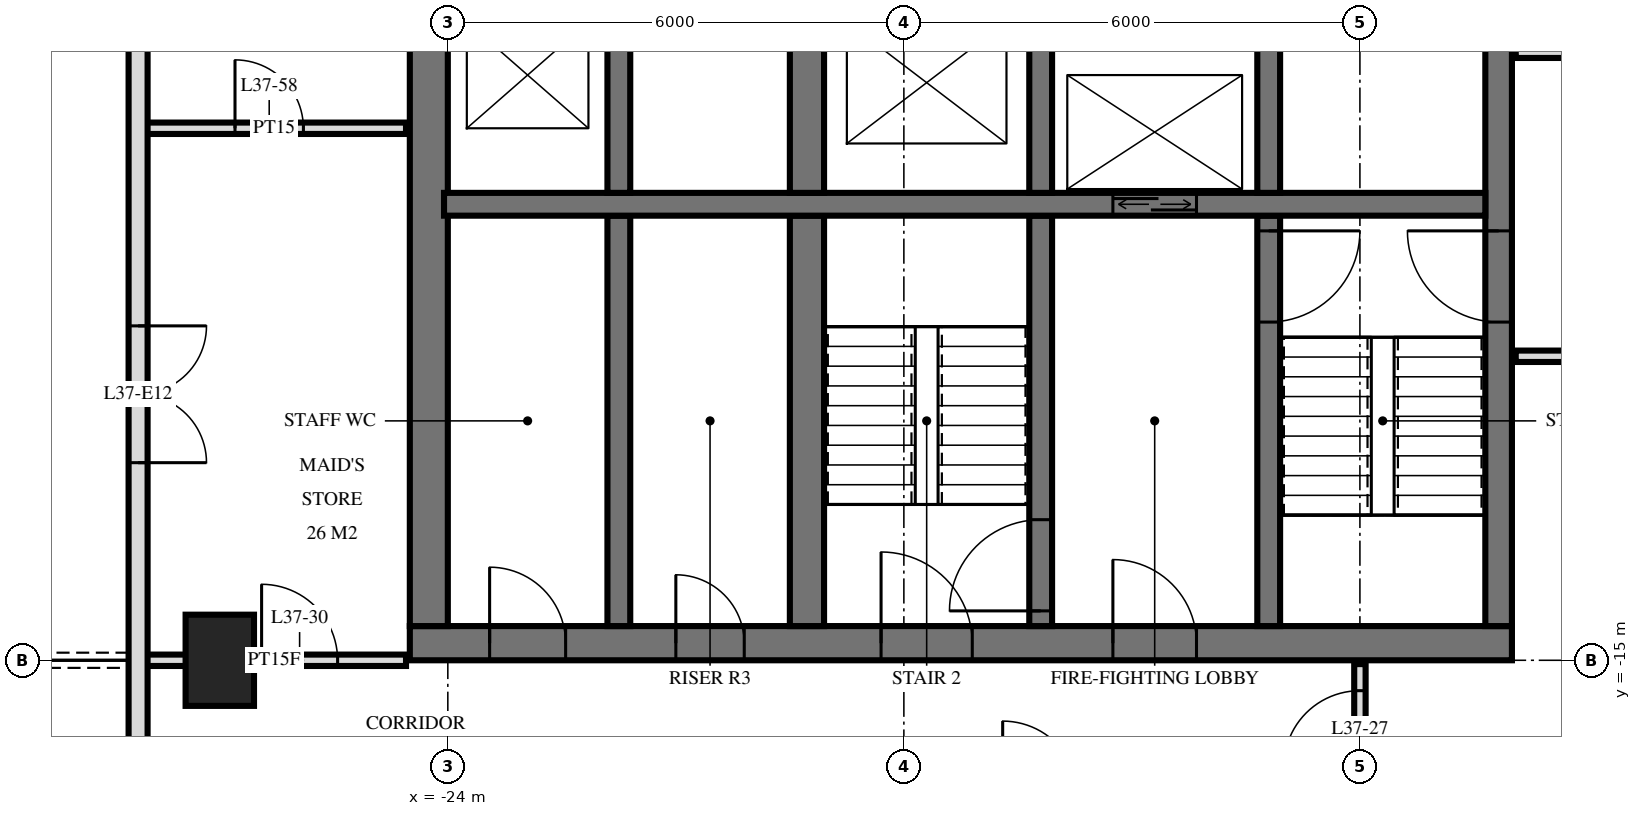
"""IFC4 building model, lengths in metres.
Left out: names, types, materials, properties, quantities, classifications, styles, units other than length and angle.
Written with IfcOpenShell. Run it as: python <this file> out.ifc"""

import sys

from ifc_helpers import new_model, si_unit, direction, frame, frame_2d, origin, origin_2d, place, context, subcontext, project, spatial, rectangle, extrude, element, fill, save


model = new_model("IFC4")
c1 = context("Model", 3, precision=1e-05, world=origin(), true_north=direction((0.0, 1.0)))
c2 = subcontext(c1, "Body", "Model", "MODEL_VIEW")
j1 = project(units=[si_unit("LENGTHUNIT", "METRE"), si_unit("PLANEANGLEUNIT", "RADIAN")], contexts=[c1])
p1 = place(None, origin())
s1 = spatial("IfcSite", under=j1, at=p1, CompositionType="ELEMENT")
p2 = place(p1, origin())
s2 = spatial("IfcBuilding", under=s1, at=p2, CompositionType="ELEMENT")
p3 = place(p2, frame((0.0, 0.0, 145.2)))
s3 = spatial("IfcBuildingStorey", under=s2, at=p3, CompositionType="ELEMENT", Elevation=145.2)
p4 = place(p3, frame((-27.0, -15.0, 0.0), z_axis=(0.0, 0.0, 1.0), x_axis=(0.0, 1.0, 0.0)))
e1 = element("IfcColumn", 1, at=p4, inside=s3, PredefinedType="COLUMN", context=c2, shape_type="SweptSolid", body=[
    extrude(rectangle(XDim=1.2, YDim=0.9, at=origin_2d()), origin(), (0.0, 0.0, 1.0), 3.6),
])
p5 = place(p3, frame((-24.5, -14.775, 0.0), z_axis=(0.0, 0.0, 1.0), x_axis=(1.0, 0.0, 0.0)))
e2 = element("IfcWall", 2, at=p5, inside=s3, PredefinedType="SHEAR", context=c2, shape_type="SweptSolid", body=[
    extrude(rectangle(XDim=14.5, YDim=0.45, at=frame_2d((7.25, 0.0))), origin(), (0.0, 0.0, 1.0), 3.6),
])
p6 = place(p5, frame((6.2, 0.0, 0.0)))
e3 = element("IfcOpeningElement", 3, at=p6, cuts=e2, PredefinedType="OPENING", context=c2, shape_type="SweptSolid", body=[
    extrude(rectangle(XDim=1.2, YDim=2.1, at=frame_2d((0.6, 1.05))), frame((0.0, 0.235, 0.0), z_axis=(0.0, -1.0, 0.0), x_axis=(1.0, 0.0, 0.0)), (0.0, 0.0, 1.0), 0.47),
])
p7 = place(p5, frame((9.25, 0.0, 0.0)))
e4 = element("IfcOpeningElement", 4, at=p7, cuts=e2, PredefinedType="OPENING", context=c2, shape_type="SweptSolid", body=[
    extrude(rectangle(XDim=1.1, YDim=2.1, at=frame_2d((0.55, 1.05))), frame((0.0, 0.235, 0.0), z_axis=(0.0, -1.0, 0.0), x_axis=(1.0, 0.0, 0.0)), (0.0, 0.0, 1.0), 0.47),
])
p8 = place(p5, frame((3.5, 0.0, 0.0)))
e5 = element("IfcOpeningElement", 5, at=p8, cuts=e2, PredefinedType="OPENING", context=c2, shape_type="SweptSolid", body=[
    extrude(rectangle(XDim=0.9, YDim=2.1, at=frame_2d((0.45, 1.05))), frame((0.0, 0.235, 0.0), z_axis=(0.0, -1.0, 0.0), x_axis=(1.0, 0.0, 0.0)), (0.0, 0.0, 1.0), 0.47),
])
p9 = place(p5, frame((1.05, 0.0, 0.0)))
e6 = element("IfcOpeningElement", 6, at=p9, cuts=e2, PredefinedType="OPENING", context=c2, shape_type="SweptSolid", body=[
    extrude(rectangle(XDim=1.0, YDim=2.1, at=frame_2d((0.5, 1.05))), frame((0.0, 0.235, 0.0), z_axis=(0.0, -1.0, 0.0), x_axis=(1.0, 0.0, 0.0)), (0.0, 0.0, 1.0), 0.47),
])
p10 = place(p3, frame((-10.175, -14.55, 0.0), z_axis=(0.0, 0.0, 1.0), x_axis=(0.0, 1.0, 0.0)))
e7 = element("IfcWall", 7, at=p10, inside=s3, PredefinedType="SHEAR", context=c2, shape_type="SweptSolid", body=[
    extrude(rectangle(XDim=14.1, YDim=0.35, at=frame_2d((7.05, 0.0))), origin(), (0.0, 0.0, 1.0), 3.6),
])
p11 = place(p10, frame((8.4, 0.0, 0.0)))
e8 = element("IfcOpeningElement", 8, at=p11, cuts=e7, PredefinedType="OPENING", context=c2, shape_type="SweptSolid", body=[
    extrude(rectangle(XDim=1.4, YDim=2.4, at=frame_2d((0.7, 1.2))), frame((0.0, 0.185, 0.0), z_axis=(0.0, -1.0, 0.0), x_axis=(1.0, 0.0, 0.0)), (0.0, 0.0, 1.0), 0.37),
])
p12 = place(p10, frame((10.0, 0.0, 0.0)))
e9 = element("IfcOpeningElement", 9, at=p12, cuts=e7, PredefinedType="OPENING", context=c2, shape_type="SweptSolid", body=[
    extrude(rectangle(XDim=1.4, YDim=2.4, at=frame_2d((0.7, 1.2))), frame((0.0, 0.185, 0.0), z_axis=(0.0, -1.0, 0.0), x_axis=(1.0, 0.0, 0.0)), (0.0, 0.0, 1.0), 0.37),
])
p13 = place(p10, frame((4.0, 0.0, 0.0)))
e10 = element("IfcOpeningElement", 10, at=p13, cuts=e7, PredefinedType="OPENING", context=c2, shape_type="SweptSolid", body=[
    extrude(rectangle(XDim=1.2, YDim=2.1, at=frame_2d((0.6, 1.05))), frame((0.0, 0.185, 0.0), z_axis=(0.0, -1.0, 0.0), x_axis=(1.0, 0.0, 0.0)), (0.0, 0.0, 1.0), 0.37),
])
p14 = place(p3, frame((-24.25, -14.55, 0.0), z_axis=(0.0, 0.0, 1.0), x_axis=(0.0, 1.0, 0.0)))
e11 = element("IfcWall", 11, at=p14, inside=s3, PredefinedType="SHEAR", context=c2, shape_type="SweptSolid", body=[
    extrude(rectangle(XDim=14.1, YDim=0.5, at=frame_2d((7.05, 0.0))), origin(), (0.0, 0.0, 1.0), 3.6),
])
p15 = place(p3, frame((-24.05, -9.0, 0.0), z_axis=(0.0, 0.0, 1.0), x_axis=(1.0, 0.0, 0.0)))
e12 = element("IfcWall", 12, at=p15, inside=s3, PredefinedType="SHEAR", context=c2, shape_type="SweptSolid", body=[
    extrude(rectangle(XDim=13.7, YDim=0.3, at=frame_2d((6.85, 0.0))), origin(), (0.0, 0.0, 1.0), 3.6),
])
p16 = place(p15, frame((8.8, 0.0, 0.0)))
e13 = element("IfcOpeningElement", 13, at=p16, cuts=e12, PredefinedType="OPENING", context=c2, shape_type="SweptSolid", body=[
    extrude(rectangle(XDim=1.1, YDim=2.1, at=frame_2d((0.55, 1.05))), frame((0.0, 0.16, 0.0), z_axis=(0.0, -1.0, 0.0), x_axis=(1.0, 0.0, 0.0)), (0.0, 0.0, 1.0), 0.32),
])
p17 = place(p3, frame((-13.2, -8.85, 0.0), z_axis=(0.0, 0.0, 1.0), x_axis=(0.0, 1.0, 0.0)))
e14 = element("IfcWall", 14, at=p17, inside=s3, PredefinedType="SHEAR", context=c2, shape_type="SweptSolid", body=[
    extrude(rectangle(XDim=2.3, YDim=0.3, at=frame_2d((1.15, 0.0))), origin(), (0.0, 0.0, 1.0), 3.6),
])
p18 = place(p3, frame((-13.2, -14.55, 0.0), z_axis=(0.0, 0.0, 1.0), x_axis=(0.0, 1.0, 0.0)))
e15 = element("IfcWall", 15, at=p18, inside=s3, PredefinedType="SHEAR", context=c2, shape_type="SweptSolid", body=[
    extrude(rectangle(XDim=5.4, YDim=0.3, at=frame_2d((2.7, 0.0))), origin(), (0.0, 0.0, 1.0), 3.6),
])
p19 = place(p18, frame((4.0, 0.0, 0.0)))
e16 = element("IfcOpeningElement", 16, at=p19, cuts=e15, PredefinedType="OPENING", context=c2, shape_type="SweptSolid", body=[
    extrude(rectangle(XDim=1.2, YDim=2.1, at=frame_2d((0.6, 1.05))), frame((0.0, 0.16, 0.0), z_axis=(0.0, -1.0, 0.0), x_axis=(1.0, 0.0, 0.0)), (0.0, 0.0, 1.0), 0.32),
])
p20 = place(p3, frame((-16.2, -8.85, 0.0), z_axis=(0.0, 0.0, 1.0), x_axis=(0.0, 1.0, 0.0)))
e17 = element("IfcWall", 17, at=p20, inside=s3, PredefinedType="SHEAR", context=c2, shape_type="SweptSolid", body=[
    extrude(rectangle(XDim=2.3, YDim=0.3, at=frame_2d((1.15, 0.0))), origin(), (0.0, 0.0, 1.0), 3.6),
])
p21 = place(p3, frame((-16.2, -14.55, 0.0), z_axis=(0.0, 0.0, 1.0), x_axis=(0.0, 1.0, 0.0)))
e18 = element("IfcWall", 18, at=p21, inside=s3, PredefinedType="SHEAR", context=c2, shape_type="SweptSolid", body=[
    extrude(rectangle(XDim=5.4, YDim=0.3, at=frame_2d((2.7, 0.0))), origin(), (0.0, 0.0, 1.0), 3.6),
])
p22 = place(p21, frame((0.2, 0.0, 0.0)))
e19 = element("IfcOpeningElement", 19, at=p22, cuts=e18, PredefinedType="OPENING", context=c2, shape_type="SweptSolid", body=[
    extrude(rectangle(XDim=1.2, YDim=2.1, at=frame_2d((0.6, 1.05))), frame((0.0, 0.16, 0.0), z_axis=(0.0, -1.0, 0.0), x_axis=(1.0, 0.0, 0.0)), (0.0, 0.0, 1.0), 0.32),
])
p23 = place(p3, frame((-19.275, -8.85, 0.0), z_axis=(0.0, 0.0, 1.0), x_axis=(0.0, 1.0, 0.0)))
e20 = element("IfcWall", 20, at=p23, inside=s3, PredefinedType="SHEAR", context=c2, shape_type="SweptSolid", body=[
    extrude(rectangle(XDim=2.3, YDim=0.45, at=frame_2d((1.15, 0.0))), origin(), (0.0, 0.0, 1.0), 3.6),
])
p24 = place(p3, frame((-19.275, -14.55, 0.0), z_axis=(0.0, 0.0, 1.0), x_axis=(0.0, 1.0, 0.0)))
e21 = element("IfcWall", 21, at=p24, inside=s3, PredefinedType="SHEAR", context=c2, shape_type="SweptSolid", body=[
    extrude(rectangle(XDim=5.4, YDim=0.45, at=frame_2d((2.7, 0.0))), origin(), (0.0, 0.0, 1.0), 3.6),
])
p25 = place(p3, frame((-21.75, -8.85, 0.0), z_axis=(0.0, 0.0, 1.0), x_axis=(0.0, 1.0, 0.0)))
e22 = element("IfcWall", 22, at=p25, inside=s3, PredefinedType="SHEAR", context=c2, shape_type="SweptSolid", body=[
    extrude(rectangle(XDim=2.3, YDim=0.3, at=frame_2d((1.15, 0.0))), origin(), (0.0, 0.0, 1.0), 3.6),
])
p26 = place(p3, frame((-21.75, -14.55, 0.0), z_axis=(0.0, 0.0, 1.0), x_axis=(0.0, 1.0, 0.0)))
e23 = element("IfcWall", 23, at=p26, inside=s3, PredefinedType="SHEAR", context=c2, shape_type="SweptSolid", body=[
    extrude(rectangle(XDim=5.4, YDim=0.3, at=frame_2d((2.7, 0.0))), origin(), (0.0, 0.0, 1.0), 3.6),
])
p27 = place(p3, frame((-28.075, -3.325, 0.0), z_axis=(0.0, 0.0, 1.0), x_axis=(0.0, -1.0, 0.0)))
e24 = element("IfcWall", 24, at=p27, inside=s3, PredefinedType="SOLIDWALL", context=c2, shape_type="SweptSolid", body=[
    extrude(rectangle(XDim=25.951, YDim=0.25, at=frame_2d((12.975, 0.0))), origin(), (0.0, 0.0, 1.0), 3.32),
])
p28 = place(p27, frame((7.275, 0.0, 0.0)))
e25 = element("IfcOpeningElement", 25, at=p28, cuts=e24, PredefinedType="OPENING", context=c2, shape_type="SweptSolid", body=[
    extrude(rectangle(XDim=1.8, YDim=2.4, at=frame_2d((0.9, 1.2))), frame((0.0, 0.135, 0.0), z_axis=(0.0, -1.0, 0.0), x_axis=(1.0, 0.0, 0.0)), (0.0, 0.0, 1.0), 0.27),
])
p29 = place(p27, frame((18.175, 0.0, 0.0)))
e26 = element("IfcOpeningElement", 26, at=p29, cuts=e24, PredefinedType="OPENING", context=c2, shape_type="SweptSolid", body=[
    extrude(rectangle(XDim=1.8, YDim=2.4, at=frame_2d((0.9, 1.2))), frame((0.0, 0.135, 0.0), z_axis=(0.0, -1.0, 0.0), x_axis=(1.0, 0.0, 0.0)), (0.0, 0.0, 1.0), 0.27),
])
p30 = place(p27, frame((21.075, 0.0, 0.0)))
e27 = element("IfcOpeningElement", 27, at=p30, cuts=e24, PredefinedType="OPENING", context=c2, shape_type="SweptSolid", body=[
    extrude(rectangle(XDim=1.8, YDim=2.4, at=frame_2d((0.9, 1.2))), frame((0.0, 0.135, 0.0), z_axis=(0.0, -1.0, 0.0), x_axis=(1.0, 0.0, 0.0)), (0.0, 0.0, 1.0), 0.27),
])
p31 = place(p27, frame((23.825, 0.0, 0.3)))
e28 = element("IfcOpeningElement", 28, at=p31, cuts=e24, PredefinedType="OPENING", context=c2, shape_type="SweptSolid", body=[
    extrude(rectangle(XDim=1.8, YDim=2.1, at=frame_2d((0.9, 1.05))), frame((0.0, 0.135, 0.0), z_axis=(0.0, -1.0, 0.0), x_axis=(1.0, 0.0, 0.0)), (0.0, 0.0, 1.0), 0.27),
])
p32 = place(p3, frame((-12.0, -16.8, 0.0), z_axis=(0.0, 0.0, 1.0), x_axis=(0.0, 1.0, 0.0)))
e29 = element("IfcWall", 29, at=p32, inside=s3, PredefinedType="PARTITIONING", context=c2, shape_type="SweptSolid", body=[
    extrude(rectangle(XDim=1.75, YDim=0.15, at=frame_2d((0.875, 0.0))), origin(), (0.0, 0.0, 1.0), 3.32),
])
p33 = place(p32, frame((0.4, 0.0, 0.0)))
e30 = element("IfcOpeningElement", 30, at=p33, cuts=e29, PredefinedType="OPENING", context=c2, shape_type="SweptSolid", body=[
    extrude(rectangle(XDim=1.0, YDim=2.1, at=frame_2d((0.5, 1.05))), frame((0.0, 0.085, 0.0), z_axis=(0.0, -1.0, 0.0), x_axis=(1.0, 0.0, 0.0)), (0.0, 0.0, 1.0), 0.17),
])
p34 = place(p3, frame((-28.02, -15.0, 0.0), z_axis=(0.0, 0.0, 1.0), x_axis=(1.0, 0.0, 0.0)))
e31 = element("IfcWall", 31, at=p34, inside=s3, PredefinedType="PARTITIONING", context=c2, shape_type="SweptSolid", body=[
    extrude(rectangle(XDim=3.47, YDim=0.15, at=frame_2d((1.735, 0.0))), origin(), (0.0, 0.0, 1.0), 3.32),
])
p35 = place(p34, frame((1.57, 0.0, 0.0)))
e32 = element("IfcOpeningElement", 32, at=p35, cuts=e31, PredefinedType="OPENING", context=c2, shape_type="SweptSolid", body=[
    extrude(rectangle(XDim=1.0, YDim=2.1, at=frame_2d((0.5, 1.05))), frame((0.0, 0.085, 0.0), z_axis=(0.0, -1.0, 0.0), x_axis=(1.0, 0.0, 0.0)), (0.0, 0.0, 1.0), 0.17),
])
p36 = place(p3, frame((-9.95, -11.0, 0.0), z_axis=(0.0, 0.0, 1.0), x_axis=(1.0, 0.0, 0.0)))
e33 = element("IfcWall", 33, at=p36, inside=s3, PredefinedType="PARTITIONING", context=c2, shape_type="SweptSolid", body=[
    extrude(rectangle(XDim=19.9, YDim=0.15, at=frame_2d((9.95, 0.0))), origin(), (0.0, 0.0, 1.0), 3.32),
])
p37 = place(p36, frame((9.45, 0.0, 0.0)))
e34 = element("IfcOpeningElement", 34, at=p37, cuts=e33, PredefinedType="OPENING", context=c2, shape_type="SweptSolid", body=[
    extrude(rectangle(XDim=1.0, YDim=2.1, at=frame_2d((0.5, 1.05))), frame((0.0, 0.085, 0.0), z_axis=(0.0, -1.0, 0.0), x_axis=(1.0, 0.0, 0.0)), (0.0, 0.0, 1.0), 0.17),
])
p38 = place(p36, frame((3.45, 0.0, 0.0)))
e35 = element("IfcOpeningElement", 35, at=p38, cuts=e33, PredefinedType="OPENING", context=c2, shape_type="SweptSolid", body=[
    extrude(rectangle(XDim=1.0, YDim=2.1, at=frame_2d((0.5, 1.05))), frame((0.0, 0.085, 0.0), z_axis=(0.0, -1.0, 0.0), x_axis=(1.0, 0.0, 0.0)), (0.0, 0.0, 1.0), 0.17),
])
p39 = place(p3, frame((-28.02, -8.0, 0.0), z_axis=(0.0, 0.0, 1.0), x_axis=(1.0, 0.0, 0.0)))
e36 = element("IfcWall", 36, at=p39, inside=s3, PredefinedType="PARTITIONING", context=c2, shape_type="SweptSolid", body=[
    extrude(rectangle(XDim=3.47, YDim=0.15, at=frame_2d((1.735, 0.0))), origin(), (0.0, 0.0, 1.0), 3.32),
])
p40 = place(p39, frame((1.22, 0.0, 0.0)))
e37 = element("IfcOpeningElement", 37, at=p40, cuts=e36, PredefinedType="OPENING", context=c2, shape_type="SweptSolid", body=[
    extrude(rectangle(XDim=0.9, YDim=2.1, at=frame_2d((0.45, 1.05))), frame((0.0, 0.085, 0.0), z_axis=(0.0, -1.0, 0.0), x_axis=(1.0, 0.0, 0.0)), (0.0, 0.0, 1.0), 0.17),
])
p41 = place(p3, frame((-9.95, -7.0, 0.0), z_axis=(0.0, 0.0, 1.0), x_axis=(1.0, 0.0, 0.0)))
e38 = element("IfcWall", 38, at=p41, inside=s3, PredefinedType="PARTITIONING", context=c2, shape_type="SweptSolid", body=[
    extrude(rectangle(XDim=19.9, YDim=0.15, at=frame_2d((9.95, 0.0))), origin(), (0.0, 0.0, 1.0), 3.32),
])
p42 = place(p41, frame((9.45, 0.0, 0.0)))
e39 = element("IfcOpeningElement", 39, at=p42, cuts=e38, PredefinedType="OPENING", context=c2, shape_type="SweptSolid", body=[
    extrude(rectangle(XDim=1.0, YDim=2.1, at=frame_2d((0.5, 1.05))), frame((0.0, 0.085, 0.0), z_axis=(0.0, -1.0, 0.0), x_axis=(1.0, 0.0, 0.0)), (0.0, 0.0, 1.0), 0.17),
])
p43 = place(p41, frame((15.45, 0.0, 0.0)))
e40 = element("IfcOpeningElement", 40, at=p43, cuts=e38, PredefinedType="OPENING", context=c2, shape_type="SweptSolid", body=[
    extrude(rectangle(XDim=1.0, YDim=2.1, at=frame_2d((0.5, 1.05))), frame((0.0, 0.085, 0.0), z_axis=(0.0, -1.0, 0.0), x_axis=(1.0, 0.0, 0.0)), (0.0, 0.0, 1.0), 0.17),
])
p44 = place(p28, origin())
e41 = element("IfcDoor", 41, at=p44, inside=s3, OperationType="DOUBLE_DOOR_SINGLE_SWING", PredefinedType="DOOR", context=c2, shape_type="SweptSolid", body=[
    extrude(rectangle(XDim=1.8, YDim=2.4, at=frame_2d((0.9, 1.2))), frame((0.0, 0.025, 0.0), z_axis=(0.0, -1.0, 0.0), x_axis=(1.0, 0.0, 0.0)), (0.0, 0.0, 1.0), 0.05),
])
fill(e25, e41)
p45 = place(p16, origin())
e42 = element("IfcDoor", 42, at=p45, inside=s3, OperationType="DOUBLE_DOOR_SLIDING", PredefinedType="USERDEFINED", context=c2, shape_type="SweptSolid", body=[
    extrude(rectangle(XDim=1.1, YDim=2.1, at=frame_2d((0.55, 1.05))), frame((0.0, 0.025, 0.0), z_axis=(0.0, -1.0, 0.0), x_axis=(1.0, 0.0, 0.0)), (0.0, 0.0, 1.0), 0.05),
])
fill(e13, e42)
p46 = place(p13, origin())
e43 = element("IfcDoor", 43, at=p46, inside=s3, OperationType="SINGLE_SWING_LEFT", PredefinedType="DOOR", context=c2, shape_type="SweptSolid", body=[
    extrude(rectangle(XDim=1.2, YDim=2.1, at=frame_2d((0.6, 1.05))), frame((0.0, 0.025, 0.0), z_axis=(0.0, -1.0, 0.0), x_axis=(1.0, 0.0, 0.0)), (0.0, 0.0, 1.0), 0.05),
])
fill(e10, e43)
p47 = place(p6, origin())
e44 = element("IfcDoor", 44, at=p47, inside=s3, OperationType="SINGLE_SWING_RIGHT", PredefinedType="DOOR", context=c2, shape_type="SweptSolid", body=[
    extrude(rectangle(XDim=1.2, YDim=2.1, at=frame_2d((0.6, 1.05))), frame((0.0, 0.025, 0.0), z_axis=(0.0, -1.0, 0.0), x_axis=(1.0, 0.0, 0.0)), (0.0, 0.0, 1.0), 0.05),
])
fill(e3, e44)
p48 = place(p7, origin())
e45 = element("IfcDoor", 45, at=p48, inside=s3, OperationType="SINGLE_SWING_RIGHT", PredefinedType="DOOR", context=c2, shape_type="SweptSolid", body=[
    extrude(rectangle(XDim=1.1, YDim=2.1, at=frame_2d((0.55, 1.05))), frame((0.0, 0.025, 0.0), z_axis=(0.0, -1.0, 0.0), x_axis=(1.0, 0.0, 0.0)), (0.0, 0.0, 1.0), 0.05),
])
fill(e4, e45)
p49 = place(p8, origin())
e46 = element("IfcDoor", 46, at=p49, inside=s3, OperationType="SINGLE_SWING_RIGHT", PredefinedType="DOOR", context=c2, shape_type="SweptSolid", body=[
    extrude(rectangle(XDim=0.9, YDim=2.1, at=frame_2d((0.45, 1.05))), frame((0.0, 0.025, 0.0), z_axis=(0.0, -1.0, 0.0), x_axis=(1.0, 0.0, 0.0)), (0.0, 0.0, 1.0), 0.05),
])
fill(e5, e46)
p50 = place(p9, origin())
e47 = element("IfcDoor", 47, at=p50, inside=s3, OperationType="SINGLE_SWING_RIGHT", PredefinedType="DOOR", context=c2, shape_type="SweptSolid", body=[
    extrude(rectangle(XDim=1.0, YDim=2.1, at=frame_2d((0.5, 1.05))), frame((0.0, 0.025, 0.0), z_axis=(0.0, -1.0, 0.0), x_axis=(1.0, 0.0, 0.0)), (0.0, 0.0, 1.0), 0.05),
])
fill(e6, e47)
p51 = place(p19, frame((0.6, 0.0, 0.0), z_axis=(0.0, 0.0, 1.0), x_axis=(-1.0, 0.0, 0.0)))
e48 = element("IfcDoor", 48, at=p51, inside=s3, OperationType="SINGLE_SWING_RIGHT", PredefinedType="DOOR", context=c2, shape_type="SweptSolid", body=[
    extrude(rectangle(XDim=1.2, YDim=2.1, at=frame_2d((0.0, 1.05))), frame((0.0, -0.025, 0.0), z_axis=(0.0, 1.0, 0.0), x_axis=(-1.0, 0.0, 0.0)), (0.0, 0.0, 1.0), 0.05),
])
fill(e16, e48)
p52 = place(p22, origin())
e49 = element("IfcDoor", 49, at=p52, inside=s3, OperationType="SINGLE_SWING_RIGHT", PredefinedType="DOOR", context=c2, shape_type="SweptSolid", body=[
    extrude(rectangle(XDim=1.2, YDim=2.1, at=frame_2d((0.6, 1.05))), frame((0.0, 0.025, 0.0), z_axis=(0.0, -1.0, 0.0), x_axis=(1.0, 0.0, 0.0)), (0.0, 0.0, 1.0), 0.05),
])
fill(e19, e49)
p53 = place(p33, origin())
e50 = element("IfcDoor", 50, at=p53, inside=s3, OperationType="SINGLE_SWING_RIGHT", PredefinedType="DOOR", context=c2, shape_type="SweptSolid", body=[
    extrude(rectangle(XDim=1.0, YDim=2.1, at=frame_2d((0.5, 1.05))), frame((0.0, 0.025, 0.0), z_axis=(0.0, -1.0, 0.0), x_axis=(1.0, 0.0, 0.0)), (0.0, 0.0, 1.0), 0.05),
])
fill(e30, e50)
p54 = place(p35, origin())
e51 = element("IfcDoor", 51, at=p54, inside=s3, OperationType="SINGLE_SWING_RIGHT", PredefinedType="DOOR", context=c2, shape_type="SweptSolid", body=[
    extrude(rectangle(XDim=1.0, YDim=2.1, at=frame_2d((0.5, 1.05))), frame((0.0, 0.025, 0.0), z_axis=(0.0, -1.0, 0.0), x_axis=(1.0, 0.0, 0.0)), (0.0, 0.0, 1.0), 0.05),
])
fill(e32, e51)
p55 = place(p40, origin())
e52 = element("IfcDoor", 52, at=p55, inside=s3, OperationType="SINGLE_SWING_RIGHT", PredefinedType="DOOR", context=c2, shape_type="SweptSolid", body=[
    extrude(rectangle(XDim=0.9, YDim=2.1, at=frame_2d((0.45, 1.05))), frame((0.0, 0.025, 0.0), z_axis=(0.0, -1.0, 0.0), x_axis=(1.0, 0.0, 0.0)), (0.0, 0.0, 1.0), 0.05),
])
fill(e37, e52)
save(model, sys.argv[1])
